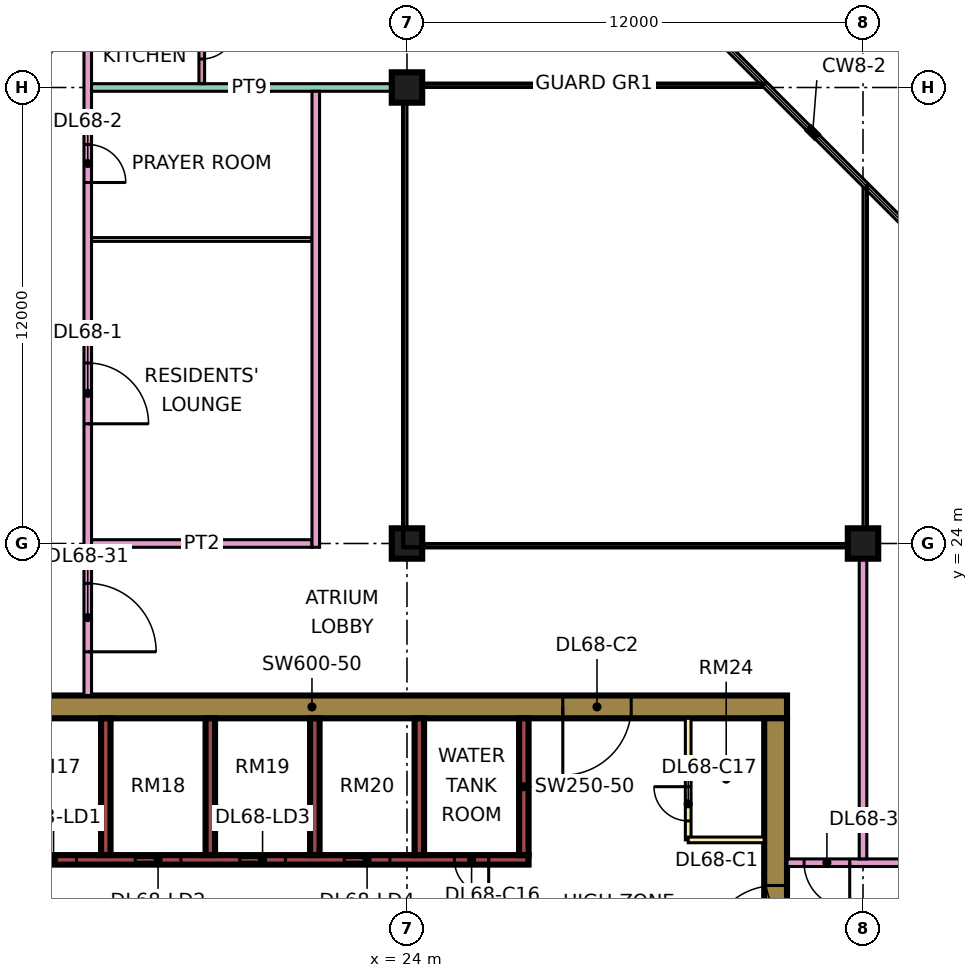
"""IFC4 building model, lengths in metres.
Left out: names, types, materials, properties, quantities, classifications, styles, units other than length and angle.
Written with IfcOpenShell. Run it as: python <this file> out.ifc"""

import sys

from ifc_helpers import new_model, si_unit, direction, frame, frame_2d, origin, origin_2d, place, context, subcontext, project, spatial, rectangle, extrude, element, fill, save


model = new_model("IFC4")
c1 = context("Model", 3, precision=1e-05, world=origin(), true_north=direction((0.0, 1.0)))
c2 = subcontext(c1, "Body", "Model", "MODEL_VIEW")
j1 = project(units=[si_unit("LENGTHUNIT", "METRE"), si_unit("PLANEANGLEUNIT", "RADIAN")], contexts=[c1])
p1 = place(None, origin())
s1 = spatial("IfcSite", under=j1, at=p1, CompositionType="ELEMENT")
p2 = place(p1, origin())
s2 = spatial("IfcBuilding", under=s1, at=p2, CompositionType="ELEMENT")
p3 = place(p2, frame((0.0, 0.0, 292.15)))
s3 = spatial("IfcBuildingStorey", under=s2, at=p3, CompositionType="ELEMENT", Elevation=292.15)
for number, where, z_axis, x_axis in (
    (1, (24.0, 24.0, 0.0), (0.0, 0.0, 1.0), (1.0, 0.0, 0.0)),
    (2, (24.0, 36.0, 0.0), (0.0, 0.0, 1.0), (1.0, 0.0, 0.0)),
    (3, (36.0, 24.0, 0.0), (0.0, 0.0, 1.0), (1.0, 0.0, 0.0)),
):
    element("IfcColumn", number, at=place(p3, frame(where, z_axis=z_axis, x_axis=x_axis)), inside=s3, PredefinedType="COLUMN", context=c2, shape_type="SweptSolid", body=[
        extrude(rectangle(XDim=0.8, YDim=0.8, at=origin_2d()), origin(), (0.0, 0.0, 1.0), 3.75),
    ])
p4 = place(p3, frame((9.0, 19.7, 0.0), z_axis=(0.0, 0.0, 1.0), x_axis=(1.0, 0.0, 0.0)))
e4 = element("IfcWall", 4, at=p4, inside=s3, PredefinedType="SHEAR", context=c2, shape_type="SweptSolid", body=[
    extrude(rectangle(XDim=25.0, YDim=0.6, at=frame_2d((12.5, 0.0))), origin(), (0.0, 0.0, 1.0), 3.75),
])
p5 = place(p4, frame((19.1, 0.0, 0.0)))
e5 = element("IfcOpeningElement", 5, at=p5, cuts=e4, PredefinedType="OPENING", context=c2, shape_type="SweptSolid", body=[
    extrude(rectangle(XDim=1.8, YDim=2.4, at=frame_2d((0.9, 1.2))), frame((0.0, 0.31, 0.0), z_axis=(0.0, -1.0, 0.0), x_axis=(1.0, 0.0, 0.0)), (0.0, 0.0, 1.0), 0.62),
])
p6 = place(p3, frame((33.7, 7.6, 0.0), z_axis=(0.0, 0.0, 1.0), x_axis=(0.0, 1.0, 0.0)))
e6 = element("IfcWall", 6, at=p6, inside=s3, PredefinedType="SHEAR", context=c2, shape_type="SweptSolid", body=[
    extrude(rectangle(XDim=11.8, YDim=0.6, at=frame_2d((5.9, 0.0))), origin(), (0.0, 0.0, 1.0), 3.75),
])
p7 = place(p6, frame((5.6, 0.0, 0.0)))
e7 = element("IfcOpeningElement", 7, at=p7, cuts=e6, PredefinedType="OPENING", context=c2, shape_type="SweptSolid", body=[
    extrude(rectangle(XDim=1.8, YDim=2.4, at=frame_2d((0.9, 1.2))), frame((0.0, 0.31, 0.0), z_axis=(0.0, -1.0, 0.0), x_axis=(1.0, 0.0, 0.0)), (0.0, 0.0, 1.0), 0.62),
])
p8 = place(p3, frame((13.45, 15.675, 0.0), z_axis=(0.0, 0.0, 1.0), x_axis=(1.0, 0.0, 0.0)))
e8 = element("IfcWall", 8, at=p8, inside=s3, PredefinedType="SHEAR", context=c2, shape_type="SweptSolid", body=[
    extrude(rectangle(XDim=13.75, YDim=0.25, at=frame_2d((6.875, 0.0))), origin(), (0.0, 0.0, 1.0), 3.75),
])
p9 = place(p8, frame((0.65, 0.0, 0.0)))
e9 = element("IfcOpeningElement", 9, at=p9, cuts=e8, PredefinedType="OPENING", context=c2, shape_type="SweptSolid", body=[
    extrude(rectangle(XDim=1.2, YDim=2.2, at=frame_2d((0.6, 1.1))), frame((0.0, 0.135, 0.0), z_axis=(0.0, -1.0, 0.0), x_axis=(1.0, 0.0, 0.0)), (0.0, 0.0, 1.0), 0.27),
])
p10 = place(p8, frame((3.4, 0.0, 0.0)))
e10 = element("IfcOpeningElement", 10, at=p10, cuts=e8, PredefinedType="OPENING", context=c2, shape_type="SweptSolid", body=[
    extrude(rectangle(XDim=1.2, YDim=2.2, at=frame_2d((0.6, 1.1))), frame((0.0, 0.135, 0.0), z_axis=(0.0, -1.0, 0.0), x_axis=(1.0, 0.0, 0.0)), (0.0, 0.0, 1.0), 0.27),
])
p11 = place(p8, frame((6.15, 0.0, 0.0)))
e11 = element("IfcOpeningElement", 11, at=p11, cuts=e8, PredefinedType="OPENING", context=c2, shape_type="SweptSolid", body=[
    extrude(rectangle(XDim=1.2, YDim=2.2, at=frame_2d((0.6, 1.1))), frame((0.0, 0.135, 0.0), z_axis=(0.0, -1.0, 0.0), x_axis=(1.0, 0.0, 0.0)), (0.0, 0.0, 1.0), 0.27),
])
p12 = place(p8, frame((8.9, 0.0, 0.0)))
e12 = element("IfcOpeningElement", 12, at=p12, cuts=e8, PredefinedType="OPENING", context=c2, shape_type="SweptSolid", body=[
    extrude(rectangle(XDim=1.2, YDim=2.2, at=frame_2d((0.6, 1.1))), frame((0.0, 0.135, 0.0), z_axis=(0.0, -1.0, 0.0), x_axis=(1.0, 0.0, 0.0)), (0.0, 0.0, 1.0), 0.27),
])
p13 = place(p8, frame((11.8, 0.0, 0.0)))
e13 = element("IfcOpeningElement", 13, at=p13, cuts=e8, PredefinedType="OPENING", context=c2, shape_type="SweptSolid", body=[
    extrude(rectangle(XDim=0.9, YDim=2.1, at=frame_2d((0.45, 1.05))), frame((0.0, 0.135, 0.0), z_axis=(0.0, -1.0, 0.0), x_axis=(1.0, 0.0, 0.0)), (0.0, 0.0, 1.0), 0.27),
])
for number, where, z_axis, x_axis in (
    (14, (16.075, 15.8, 0.0), (0.0, 0.0, 1.0), (0.0, 1.0, 0.0)),
    (15, (18.825, 15.8, 0.0), (0.0, 0.0, 1.0), (0.0, 1.0, 0.0)),
    (16, (21.575, 15.8, 0.0), (0.0, 0.0, 1.0), (0.0, 1.0, 0.0)),
    (17, (24.325, 15.8, 0.0), (0.0, 0.0, 1.0), (0.0, 1.0, 0.0)),
    (18, (27.075, 15.8, 0.0), (0.0, 0.0, 1.0), (0.0, 1.0, 0.0)),
):
    element("IfcWall", number, at=place(p3, frame(where, z_axis=z_axis, x_axis=x_axis)), inside=s3, PredefinedType="SHEAR", context=c2, shape_type="SweptSolid", body=[
        extrude(rectangle(XDim=3.6, YDim=0.25, at=frame_2d((1.8, 0.0))), origin(), (0.0, 0.0, 1.0), 3.75),
    ])
p14 = place(p3, frame((31.4, 16.2, 0.0), z_axis=(0.0, 0.0, 1.0), x_axis=(0.0, 1.0, 0.0)))
e19 = element("IfcWall", 19, at=p14, inside=s3, PredefinedType="PARTITIONING", context=c2, shape_type="SweptSolid", body=[
    extrude(rectangle(XDim=3.2, YDim=0.15, at=frame_2d((1.6, 0.0))), origin(), (0.0, 0.0, 1.0), 3.35),
])
p15 = place(p14, frame((0.5, 0.0, 0.0)))
e20 = element("IfcOpeningElement", 20, at=p15, cuts=e19, PredefinedType="OPENING", context=c2, shape_type="SweptSolid", body=[
    extrude(rectangle(XDim=0.9, YDim=2.1, at=frame_2d((0.45, 1.05))), frame((0.0, 0.085, 0.0), z_axis=(0.0, -1.0, 0.0), x_axis=(1.0, 0.0, 0.0)), (0.0, 0.0, 1.0), 0.17),
])
p16 = place(p3, frame((31.4, 16.2, 0.0), z_axis=(0.0, 0.0, 1.0), x_axis=(1.0, 0.0, 0.0)))
e21 = element("IfcWall", 21, at=p16, inside=s3, PredefinedType="PARTITIONING", context=c2, shape_type="SweptSolid", body=[
    extrude(rectangle(XDim=2.0, YDim=0.15, at=frame_2d((1.0, 0.0))), origin(), (0.0, 0.0, 1.0), 3.35),
])
p17 = place(p3, frame((15.6, 20.0, 0.0), z_axis=(0.0, 0.0, 1.0), x_axis=(0.0, 1.0, 0.0)))
e22 = element("IfcWall", 22, at=p17, inside=s3, PredefinedType="PARTITIONING", context=c2, shape_type="SweptSolid", body=[
    extrude(rectangle(XDim=27.775, YDim=0.2, at=frame_2d((13.887, 0.0))), origin(), (0.0, 0.0, 1.0), 3.35),
])
p18 = place(p17, frame((7.15, 0.0, 0.0)))
e23 = element("IfcOpeningElement", 23, at=p18, cuts=e22, PredefinedType="OPENING", context=c2, shape_type="SweptSolid", body=[
    extrude(rectangle(XDim=1.6, YDim=2.1, at=frame_2d((0.8, 1.05))), frame((0.0, 0.11, 0.0), z_axis=(0.0, -1.0, 0.0), x_axis=(1.0, 0.0, 0.0)), (0.0, 0.0, 1.0), 0.22),
])
p19 = place(p17, frame((13.5, 0.0, 0.0)))
e24 = element("IfcOpeningElement", 24, at=p19, cuts=e22, PredefinedType="OPENING", context=c2, shape_type="SweptSolid", body=[
    extrude(rectangle(XDim=1.0, YDim=2.1, at=frame_2d((0.5, 1.05))), frame((0.0, 0.11, 0.0), z_axis=(0.0, -1.0, 0.0), x_axis=(1.0, 0.0, 0.0)), (0.0, 0.0, 1.0), 0.22),
])
p20 = place(p17, frame((22.75, 0.0, 0.0)))
e25 = element("IfcOpeningElement", 25, at=p20, cuts=e22, PredefinedType="OPENING", context=c2, shape_type="SweptSolid", body=[
    extrude(rectangle(XDim=1.0, YDim=2.1, at=frame_2d((0.5, 1.05))), frame((0.0, 0.11, 0.0), z_axis=(0.0, -1.0, 0.0), x_axis=(1.0, 0.0, 0.0)), (0.0, 0.0, 1.0), 0.22),
])
p21 = place(p17, frame((1.15, 0.0, 0.0)))
e26 = element("IfcOpeningElement", 26, at=p21, cuts=e22, PredefinedType="OPENING", context=c2, shape_type="SweptSolid", body=[
    extrude(rectangle(XDim=1.8, YDim=2.1, at=frame_2d((0.9, 1.05))), frame((0.0, 0.11, 0.0), z_axis=(0.0, -1.0, 0.0), x_axis=(1.0, 0.0, 0.0)), (0.0, 0.0, 1.0), 0.22),
])
p22 = place(p17, frame((25.9, 0.0, 0.0)))
e27 = element("IfcOpeningElement", 27, at=p22, cuts=e22, PredefinedType="OPENING", context=c2, shape_type="SweptSolid", body=[
    extrude(rectangle(XDim=1.0, YDim=2.1, at=frame_2d((0.5, 1.05))), frame((0.0, 0.11, 0.0), z_axis=(0.0, -1.0, 0.0), x_axis=(1.0, 0.0, 0.0)), (0.0, 0.0, 1.0), 0.22),
])
p23 = place(p3, frame((15.7, 24.0, 0.0), z_axis=(0.0, 0.0, 1.0), x_axis=(1.0, 0.0, 0.0)))
e28 = element("IfcWall", 28, at=p23, inside=s3, PredefinedType="PARTITIONING", context=c2, shape_type="SweptSolid", body=[
    extrude(rectangle(XDim=5.8, YDim=0.2, at=frame_2d((2.9, 0.0))), origin(), (0.0, 0.0, 1.0), 3.35),
])
p24 = place(p3, frame((15.7, 32.0, 0.0), z_axis=(0.0, 0.0, 1.0), x_axis=(1.0, 0.0, 0.0)))
e29 = element("IfcWall", 29, at=p24, inside=s3, PredefinedType="PARTITIONING", context=c2, shape_type="SweptSolid", body=[
    extrude(rectangle(XDim=5.8, YDim=0.1, at=frame_2d((2.9, 0.0))), origin(), (0.0, 0.0, 1.0), 3.35),
])
p25 = place(p3, frame((15.7, 36.0, 0.0), z_axis=(0.0, 0.0, 1.0), x_axis=(1.0, 0.0, 0.0)))
e30 = element("IfcWall", 30, at=p25, inside=s3, PredefinedType="PARTITIONING", context=c2, shape_type="SweptSolid", body=[
    extrude(rectangle(XDim=8.3, YDim=0.2, at=frame_2d((4.15, 0.0))), origin(), (0.0, 0.0, 1.0), 3.35),
])
p26 = place(p3, frame((18.6, 36.1, 0.0), z_axis=(0.0, 0.0, 1.0), x_axis=(0.0, 1.0, 0.0)))
e31 = element("IfcWall", 31, at=p26, inside=s3, PredefinedType="PARTITIONING", context=c2, shape_type="SweptSolid", body=[
    extrude(rectangle(XDim=5.375, YDim=0.15, at=frame_2d((2.688, 0.0))), origin(), (0.0, 0.0, 1.0), 3.35),
])
p27 = place(p26, frame((3.45, 0.0, 0.0)))
e32 = element("IfcOpeningElement", 32, at=p27, cuts=e31, PredefinedType="OPENING", context=c2, shape_type="SweptSolid", body=[
    extrude(rectangle(XDim=0.8, YDim=2.1, at=frame_2d((0.4, 1.05))), frame((0.0, 0.085, 0.0), z_axis=(0.0, -1.0, 0.0), x_axis=(1.0, 0.0, 0.0)), (0.0, 0.0, 1.0), 0.17),
])
p28 = place(p26, frame((0.65, 0.0, 0.0)))
e33 = element("IfcOpeningElement", 33, at=p28, cuts=e31, PredefinedType="OPENING", context=c2, shape_type="SweptSolid", body=[
    extrude(rectangle(XDim=0.9, YDim=2.1, at=frame_2d((0.45, 1.05))), frame((0.0, 0.085, 0.0), z_axis=(0.0, -1.0, 0.0), x_axis=(1.0, 0.0, 0.0)), (0.0, 0.0, 1.0), 0.17),
])
p29 = place(p3, frame((21.6, 23.9, 0.0), z_axis=(0.0, 0.0, 1.0), x_axis=(0.0, 1.0, 0.0)))
e34 = element("IfcWall", 34, at=p29, inside=s3, PredefinedType="PARTITIONING", context=c2, shape_type="SweptSolid", body=[
    extrude(rectangle(XDim=12.0, YDim=0.2, at=frame_2d((6.0, 0.0))), origin(), (0.0, 0.0, 1.0), 3.35),
])
p30 = place(p3, frame((34.0, 15.6, 0.0), z_axis=(0.0, 0.0, 1.0), x_axis=(1.0, 0.0, 0.0)))
e35 = element("IfcWall", 35, at=p30, inside=s3, PredefinedType="PARTITIONING", context=c2, shape_type="SweptSolid", body=[
    extrude(rectangle(XDim=10.35, YDim=0.2, at=frame_2d((5.175, 0.0))), origin(), (0.0, 0.0, 1.0), 3.35),
])
p31 = place(p30, frame((5.6, 0.0, 0.0)))
e36 = element("IfcOpeningElement", 36, at=p31, cuts=e35, PredefinedType="OPENING", context=c2, shape_type="SweptSolid", body=[
    extrude(rectangle(XDim=1.0, YDim=2.1, at=frame_2d((0.5, 1.05))), frame((0.0, 0.11, 0.0), z_axis=(0.0, -1.0, 0.0), x_axis=(1.0, 0.0, 0.0)), (0.0, 0.0, 1.0), 0.22),
])
p32 = place(p30, frame((0.45, 0.0, 0.0)))
e37 = element("IfcOpeningElement", 37, at=p32, cuts=e35, PredefinedType="OPENING", context=c2, shape_type="SweptSolid", body=[
    extrude(rectangle(XDim=1.2, YDim=2.1, at=frame_2d((0.6, 1.05))), frame((0.0, 0.11, 0.0), z_axis=(0.0, -1.0, 0.0), x_axis=(1.0, 0.0, 0.0)), (0.0, 0.0, 1.0), 0.22),
])
p33 = place(p3, frame((36.0, 15.7, 0.0), z_axis=(0.0, 0.0, 1.0), x_axis=(0.0, 1.0, 0.0)))
e38 = element("IfcWall", 38, at=p33, inside=s3, PredefinedType="PARTITIONING", context=c2, shape_type="SweptSolid", body=[
    extrude(rectangle(XDim=8.3, YDim=0.2, at=frame_2d((4.15, 0.0))), origin(), (0.0, 0.0, 1.0), 3.35),
])
p34 = place(p9, origin())
e39 = element("IfcDoor", 39, at=p34, inside=s3, OperationType="DOUBLE_DOOR_SLIDING", PredefinedType="DOOR", context=c2, shape_type="SweptSolid", body=[
    extrude(rectangle(XDim=1.2, YDim=2.2, at=frame_2d((0.6, 1.1))), frame((0.0, 0.025, 0.0), z_axis=(0.0, -1.0, 0.0), x_axis=(1.0, 0.0, 0.0)), (0.0, 0.0, 1.0), 0.05),
])
fill(e9, e39)
p35 = place(p10, origin())
e40 = element("IfcDoor", 40, at=p35, inside=s3, OperationType="DOUBLE_DOOR_SLIDING", PredefinedType="DOOR", context=c2, shape_type="SweptSolid", body=[
    extrude(rectangle(XDim=1.2, YDim=2.2, at=frame_2d((0.6, 1.1))), frame((0.0, 0.025, 0.0), z_axis=(0.0, -1.0, 0.0), x_axis=(1.0, 0.0, 0.0)), (0.0, 0.0, 1.0), 0.05),
])
fill(e10, e40)
p36 = place(p11, origin())
e41 = element("IfcDoor", 41, at=p36, inside=s3, OperationType="DOUBLE_DOOR_SLIDING", PredefinedType="DOOR", context=c2, shape_type="SweptSolid", body=[
    extrude(rectangle(XDim=1.2, YDim=2.2, at=frame_2d((0.6, 1.1))), frame((0.0, 0.025, 0.0), z_axis=(0.0, -1.0, 0.0), x_axis=(1.0, 0.0, 0.0)), (0.0, 0.0, 1.0), 0.05),
])
fill(e11, e41)
p37 = place(p12, origin())
e42 = element("IfcDoor", 42, at=p37, inside=s3, OperationType="DOUBLE_DOOR_SLIDING", PredefinedType="DOOR", context=c2, shape_type="SweptSolid", body=[
    extrude(rectangle(XDim=1.2, YDim=2.2, at=frame_2d((0.6, 1.1))), frame((0.0, 0.025, 0.0), z_axis=(0.0, -1.0, 0.0), x_axis=(1.0, 0.0, 0.0)), (0.0, 0.0, 1.0), 0.05),
])
fill(e12, e42)
p38 = place(p7, origin())
e43 = element("IfcDoor", 43, at=p38, inside=s3, OperationType="DOUBLE_DOOR_SINGLE_SWING", PredefinedType="DOOR", context=c2, shape_type="SweptSolid", body=[
    extrude(rectangle(XDim=1.8, YDim=2.4, at=frame_2d((0.9, 1.2))), frame((0.0, 0.025, 0.0), z_axis=(0.0, -1.0, 0.0), x_axis=(1.0, 0.0, 0.0)), (0.0, 0.0, 1.0), 0.05),
])
fill(e7, e43)
p39 = place(p5, frame((1.8, 0.0, 0.0), z_axis=(0.0, 0.0, 1.0), x_axis=(-1.0, 0.0, 0.0)))
e44 = element("IfcDoor", 44, at=p39, inside=s3, OperationType="DOUBLE_DOOR_SINGLE_SWING", PredefinedType="DOOR", context=c2, shape_type="SweptSolid", body=[
    extrude(rectangle(XDim=1.8, YDim=2.4, at=frame_2d((0.9, 1.2))), frame((0.0, 0.025, 0.0), z_axis=(0.0, -1.0, 0.0), x_axis=(1.0, 0.0, 0.0)), (0.0, 0.0, 1.0), 0.05),
])
fill(e5, e44)
p40 = place(p13, origin())
e45 = element("IfcDoor", 45, at=p40, inside=s3, OperationType="SINGLE_SWING_RIGHT", PredefinedType="DOOR", context=c2, shape_type="SweptSolid", body=[
    extrude(rectangle(XDim=0.9, YDim=2.1, at=frame_2d((0.45, 1.05))), frame((0.0, 0.025, 0.0), z_axis=(0.0, -1.0, 0.0), x_axis=(1.0, 0.0, 0.0)), (0.0, 0.0, 1.0), 0.05),
])
fill(e13, e45)
p41 = place(p15, frame((0.9, 0.0, 0.0), z_axis=(0.0, 0.0, 1.0), x_axis=(-1.0, 0.0, 0.0)))
e46 = element("IfcDoor", 46, at=p41, inside=s3, OperationType="SINGLE_SWING_RIGHT", PredefinedType="DOOR", context=c2, shape_type="SweptSolid", body=[
    extrude(rectangle(XDim=0.9, YDim=2.1, at=frame_2d((0.45, 1.05))), frame((0.0, 0.025, 0.0), z_axis=(0.0, -1.0, 0.0), x_axis=(1.0, 0.0, 0.0)), (0.0, 0.0, 1.0), 0.05),
])
fill(e20, e46)
p42 = place(p18, frame((1.6, 0.0, 0.0), z_axis=(0.0, 0.0, 1.0), x_axis=(-1.0, 0.0, 0.0)))
e47 = element("IfcDoor", 47, at=p42, inside=s3, OperationType="DOUBLE_DOOR_SINGLE_SWING", PredefinedType="DOOR", context=c2, shape_type="SweptSolid", body=[
    extrude(rectangle(XDim=1.6, YDim=2.1, at=frame_2d((0.8, 1.05))), frame((0.0, 0.025, 0.0), z_axis=(0.0, -1.0, 0.0), x_axis=(1.0, 0.0, 0.0)), (0.0, 0.0, 1.0), 0.05),
])
fill(e23, e47)
p43 = place(p19, frame((1.0, 0.0, 0.0), z_axis=(0.0, 0.0, 1.0), x_axis=(-1.0, 0.0, 0.0)))
e48 = element("IfcDoor", 48, at=p43, inside=s3, OperationType="SINGLE_SWING_LEFT", PredefinedType="DOOR", context=c2, shape_type="SweptSolid", body=[
    extrude(rectangle(XDim=1.0, YDim=2.1, at=frame_2d((0.5, 1.05))), frame((0.0, 0.025, 0.0), z_axis=(0.0, -1.0, 0.0), x_axis=(1.0, 0.0, 0.0)), (0.0, 0.0, 1.0), 0.05),
])
fill(e24, e48)
p44 = place(p28, origin())
e49 = element("IfcDoor", 49, at=p44, inside=s3, OperationType="SINGLE_SWING_RIGHT", PredefinedType="DOOR", context=c2, shape_type="SweptSolid", body=[
    extrude(rectangle(XDim=0.9, YDim=2.1, at=frame_2d((0.45, 1.05))), frame((0.0, 0.025, 0.0), z_axis=(0.0, -1.0, 0.0), x_axis=(1.0, 0.0, 0.0)), (0.0, 0.0, 1.0), 0.05),
])
fill(e33, e49)
p45 = place(p32, origin())
e50 = element("IfcDoor", 50, at=p45, inside=s3, OperationType="SINGLE_SWING_RIGHT", PredefinedType="DOOR", context=c2, shape_type="SweptSolid", body=[
    extrude(rectangle(XDim=1.2, YDim=2.1, at=frame_2d((0.6, 1.05))), frame((0.0, 0.025, 0.0), z_axis=(0.0, -1.0, 0.0), x_axis=(1.0, 0.0, 0.0)), (0.0, 0.0, 1.0), 0.05),
])
fill(e37, e50)
p46 = place(p21, frame((1.8, 0.0, 0.0), z_axis=(0.0, 0.0, 1.0), x_axis=(-1.0, 0.0, 0.0)))
e51 = element("IfcDoor", 51, at=p46, inside=s3, OperationType="DOUBLE_DOOR_SINGLE_SWING", PredefinedType="DOOR", context=c2, shape_type="SweptSolid", body=[
    extrude(rectangle(XDim=1.8, YDim=2.1, at=frame_2d((0.9, 1.05))), frame((0.0, 0.025, 0.0), z_axis=(0.0, -1.0, 0.0), x_axis=(1.0, 0.0, 0.0)), (0.0, 0.0, 1.0), 0.05),
])
fill(e26, e51)
save(model, sys.argv[1])
